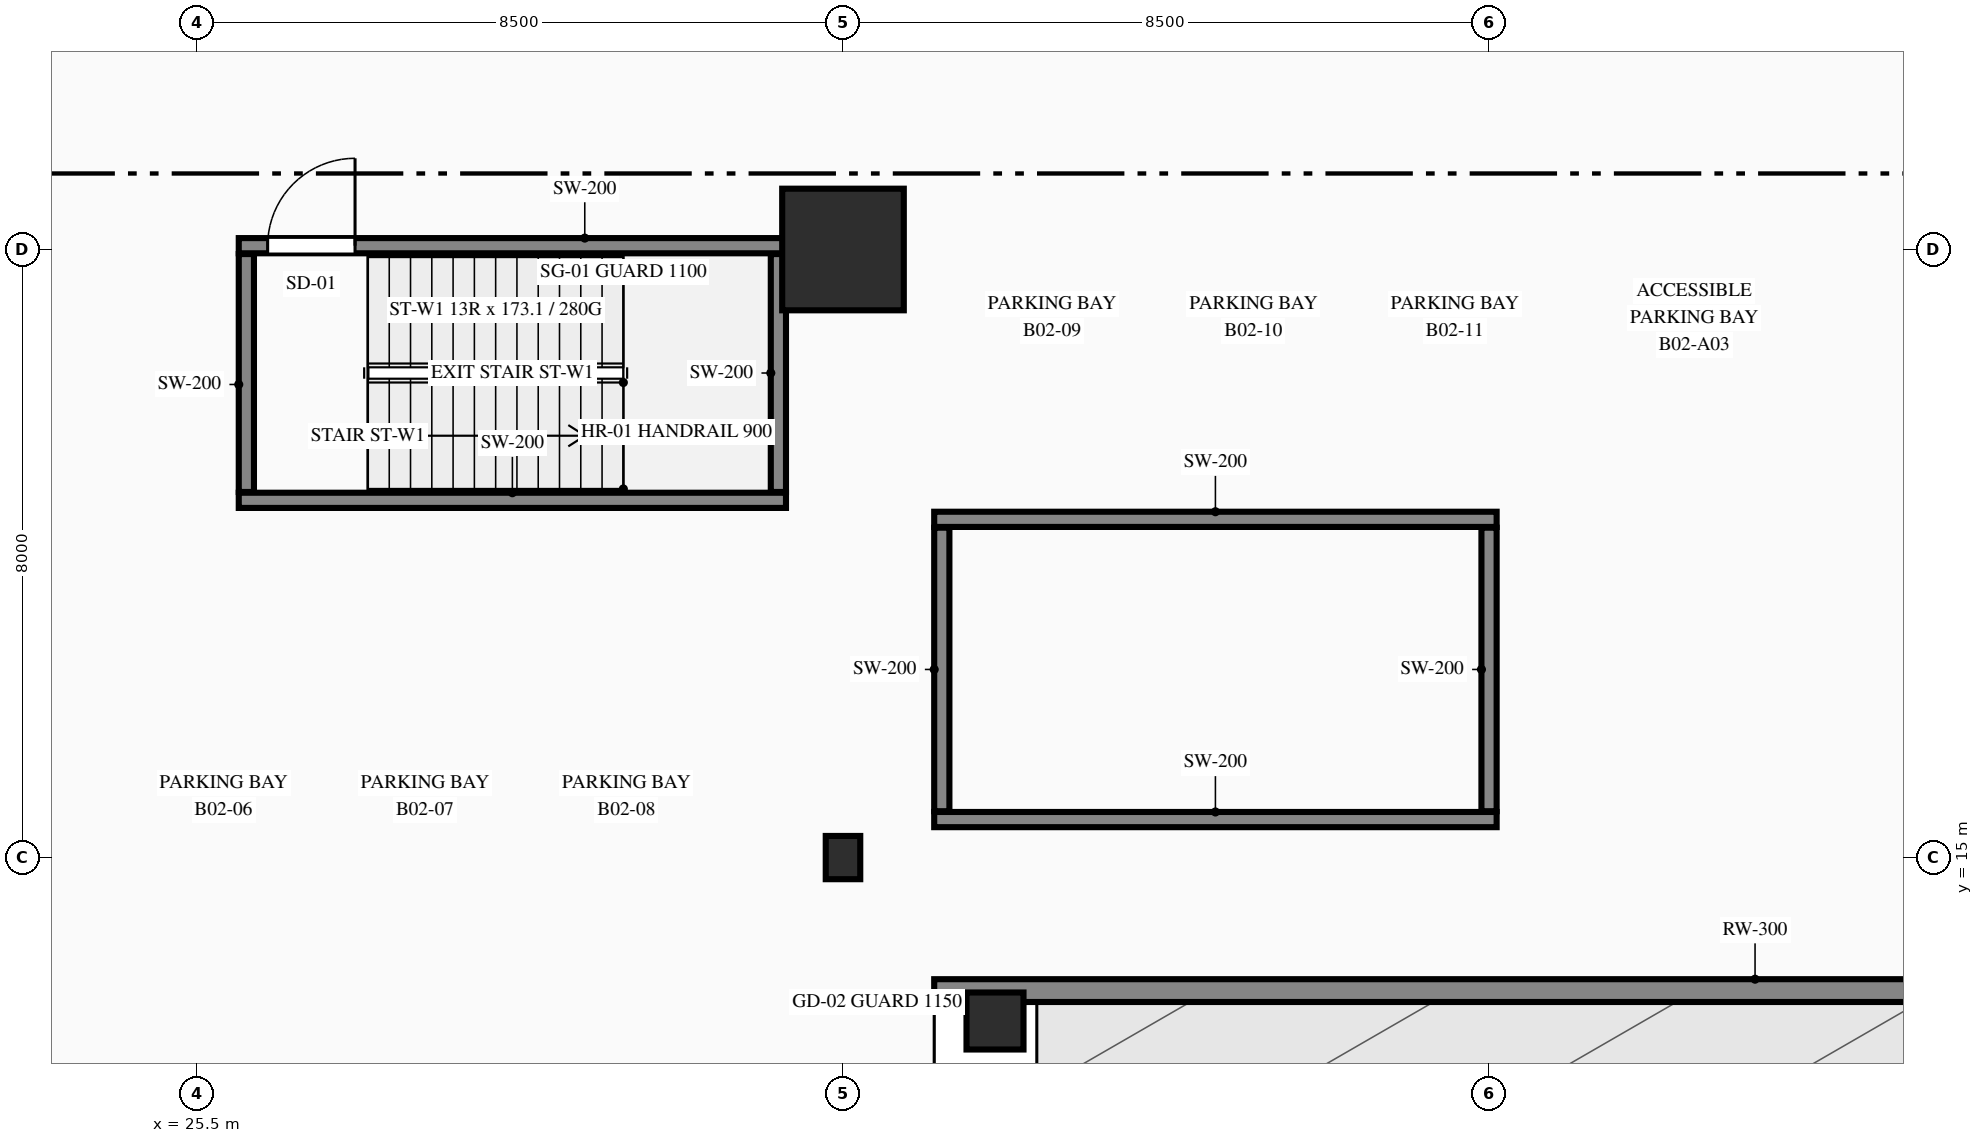
"""IFC4 building model, lengths in metres.
Left out: names, types, materials, properties, quantities, classifications, styles, units other than length and angle.
Written with IfcOpenShell. Run it as: python <this file> out.ifc"""

import sys

from ifc_helpers import new_model, si_unit, direction, frame, frame_2d, origin, origin_2d, place, context, subcontext, project, spatial, rectangle, i_section, extrude, element, fill, save


model = new_model("IFC4")
c1 = context("Model", 3, precision=1e-05, world=origin(), true_north=direction((0.0, 1.0)))
c2 = subcontext(c1, "Body", "Model", "MODEL_VIEW")
j1 = project(units=[si_unit("LENGTHUNIT", "METRE"), si_unit("PLANEANGLEUNIT", "RADIAN")], contexts=[c1])
p1 = place(None, origin())
s1 = spatial("IfcSite", under=j1, at=p1, CompositionType="ELEMENT")
p2 = place(p1, origin())
s2 = spatial("IfcBuilding", under=s1, at=p2, CompositionType="ELEMENT")
p3 = place(p2, frame((0.0, 0.0, -9.0)))
s3 = spatial("IfcBuildingStorey", under=s2, at=p3, CompositionType="ELEMENT", Elevation=-9.0)
p4 = place(p3, frame((26.05, 19.7, 0.0), z_axis=(0.0, 0.0, 1.0), x_axis=(1.0, 0.0, 0.0)))
e1 = element("IfcWall", 1, at=p4, inside=s3, PredefinedType="SHEAR", context=c2, shape_type="SweptSolid", body=[
    extrude(rectangle(XDim=7.2, YDim=0.2, at=frame_2d((3.6, 0.0))), origin(), (0.0, 0.0, 1.0), 4.5),
])
p5 = place(p3, frame((26.05, 23.05, 0.0), z_axis=(0.0, 0.0, 1.0), x_axis=(1.0, 0.0, 0.0)))
e2 = element("IfcWall", 2, at=p5, inside=s3, PredefinedType="SHEAR", context=c2, shape_type="SweptSolid", body=[
    extrude(rectangle(XDim=7.2, YDim=0.2, at=frame_2d((3.6, 0.0))), origin(), (0.0, 0.0, 1.0), 4.5),
])
p6 = place(p5, frame((0.38, 0.0, 0.0)))
e3 = element("IfcOpeningElement", 3, at=p6, cuts=e2, PredefinedType="OPENING", context=c2, shape_type="SweptSolid", body=[
    extrude(rectangle(XDim=1.15, YDim=2.2, at=frame_2d((0.575, 1.1))), frame((0.0, 0.11, 0.0), z_axis=(0.0, -1.0, 0.0), x_axis=(1.0, 0.0, 0.0)), (0.0, 0.0, 1.0), 0.22),
])
for number, where, z_axis, x_axis in (
    (4, (26.15, 19.81, 0.0), (0.0, 0.0, 1.0), (0.0, 1.0, 0.0)),
    (5, (33.15, 19.81, 0.0), (0.0, 0.0, 1.0), (0.0, 1.0, 0.0)),
):
    element("IfcWall", number, at=place(p3, frame(where, z_axis=z_axis, x_axis=x_axis)), inside=s3, PredefinedType="SHEAR", context=c2, shape_type="SweptSolid", body=[
        extrude(rectangle(XDim=3.13, YDim=0.2, at=frame_2d((1.565, 0.0))), origin(), (0.0, 0.0, 1.0), 4.5),
    ])
for number, where, z_axis, x_axis in (
    (6, (35.2, 15.5, 0.0), (0.0, 0.0, 1.0), (1.0, 0.0, 0.0)),
    (7, (35.2, 19.45, 0.0), (0.0, 0.0, 1.0), (1.0, 0.0, 0.0)),
):
    element("IfcWall", number, at=place(p3, frame(where, z_axis=z_axis, x_axis=x_axis)), inside=s3, PredefinedType="SHEAR", context=c2, shape_type="SweptSolid", body=[
        extrude(rectangle(XDim=7.4, YDim=0.2, at=frame_2d((3.7, 0.0))), origin(), (0.0, 0.0, 1.0), 4.5),
    ])
for number, where, z_axis, x_axis in (
    (8, (35.3, 15.61, 0.0), (0.0, 0.0, 1.0), (0.0, 1.0, 0.0)),
    (9, (42.5, 15.61, 0.0), (0.0, 0.0, 1.0), (0.0, 1.0, 0.0)),
):
    element("IfcWall", number, at=place(p3, frame(where, z_axis=z_axis, x_axis=x_axis)), inside=s3, PredefinedType="SHEAR", context=c2, shape_type="SweptSolid", body=[
        extrude(rectangle(XDim=3.73, YDim=0.2, at=frame_2d((1.865, 0.0))), origin(), (0.0, 0.0, 1.0), 4.5),
    ])
p7 = place(p3, frame((34.0, 15.0, 0.0), z_axis=(0.0, 0.0, 1.0), x_axis=(1.0, 0.0, 0.0)))
e10 = element("IfcColumn", 10, at=p7, inside=s3, PredefinedType="COLUMN", context=c2, shape_type="SweptSolid", body=[
    extrude(i_section(OverallWidth=0.454, OverallDepth=0.569, WebThickness=0.078, FlangeThickness=0.08, FilletRadius=0.015, at=origin_2d()), origin(), (0.0, 0.0, 1.0), 4.5),
])
p8 = place(p3, frame((34.0, 23.0, 0.0), z_axis=(0.0, 0.0, 1.0), x_axis=(1.0, 0.0, 0.0)))
e11 = element("IfcColumn", 11, at=p8, inside=s3, PredefinedType="COLUMN", context=c2, shape_type="SweptSolid", body=[
    extrude(rectangle(XDim=1.6, YDim=1.6, at=origin_2d()), origin(), (0.0, 0.0, 1.0), 4.5),
])
p9 = place(p3, frame((36.0, 12.85, 0.0), z_axis=(0.0, 0.0, 1.0), x_axis=(1.0, 0.0, 0.0)))
e12 = element("IfcColumn", 12, at=p9, inside=s3, PredefinedType="COLUMN", context=c2, shape_type="SweptSolid", body=[
    extrude(rectangle(XDim=0.75, YDim=0.75, at=origin_2d()), origin(), (0.0, 0.0, 1.0), 4.2),
])
p10 = place(p3, frame((35.2, 13.25, 0.0), z_axis=(0.0, 0.0, 1.0), x_axis=(1.0, 0.0, 0.0)))
e13 = element("IfcWall", 13, at=p10, inside=s3, PredefinedType="SOLIDWALL", context=c2, shape_type="SweptSolid", body=[
    extrude(rectangle(XDim=21.6, YDim=0.3, at=frame_2d((10.8, 0.0))), origin(), (0.0, 0.0, 1.0), 4.5),
])
p11 = place(p6, origin())
e14 = element("IfcDoor", 14, at=p11, inside=s3, OperationType="SINGLE_SWING_RIGHT", PredefinedType="DOOR", context=c2, shape_type="SweptSolid", body=[
    extrude(rectangle(XDim=1.15, YDim=2.2, at=frame_2d((0.575, 1.1))), frame((0.0, 0.025, 0.0), z_axis=(0.0, -1.0, 0.0), x_axis=(1.0, 0.0, 0.0)), (0.0, 0.0, 1.0), 0.05),
])
fill(e3, e14)
save(model, sys.argv[1])
